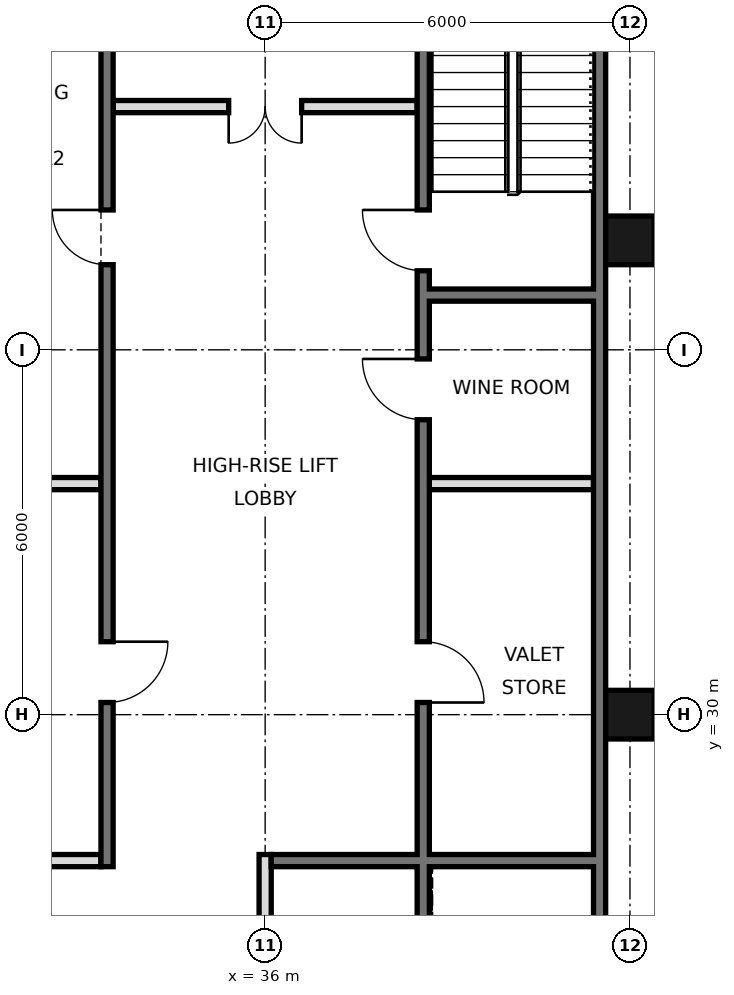
"""IFC4 building model, lengths in metres.
Left out: names, types, materials, properties, quantities, classifications, styles, units other than length and angle.
Written with IfcOpenShell. Run it as: python <this file> out.ifc"""

import sys

from ifc_helpers import new_model, si_unit, direction, frame, frame_2d, origin, origin_2d, place, context, subcontext, project, spatial, rectangle, hollow_rectangle, extrude, element, fill, save


model = new_model("IFC4")
c1 = context("Model", 3, precision=1e-05, world=origin(), true_north=direction((0.0, 1.0)))
c2 = subcontext(c1, "Body", "Model", "MODEL_VIEW")
j1 = project(units=[si_unit("LENGTHUNIT", "METRE"), si_unit("PLANEANGLEUNIT", "RADIAN")], contexts=[c1])
p1 = place(None, origin())
s1 = spatial("IfcSite", under=j1, at=p1, CompositionType="ELEMENT")
p2 = place(p1, origin())
s2 = spatial("IfcBuilding", under=s1, at=p2, CompositionType="ELEMENT")
p3 = place(p2, frame((0.0, 0.0, 67.8)))
s3 = spatial("IfcBuildingStorey", under=s2, at=p3, CompositionType="ELEMENT", Elevation=67.8)
for number, where, z_axis, x_axis in (
    (1, (42.0, 30.0, 0.0), (0.0, 0.0, 1.0), (1.0, 0.0, 0.0)),
    (2, (42.0, 37.8, 0.0), (0.0, 0.0, 1.0), (1.0, 0.0, 0.0)),
):
    element("IfcColumn", number, at=place(p3, frame(where, z_axis=z_axis, x_axis=x_axis)), inside=s3, PredefinedType="COLUMN", context=c2, shape_type="SweptSolid", body=[
        extrude(hollow_rectangle(XDim=0.8, YDim=0.8, WallThickness=0.06, at=origin_2d()), origin(), (0.0, 0.0, 1.0), 3.6),
    ])
p4 = place(p3, frame((41.5, 21.6, 0.0), z_axis=(0.0, 0.0, 1.0), x_axis=(0.0, 1.0, 0.0)))
e3 = element("IfcWall", 3, at=p4, inside=s3, PredefinedType="SOLIDWALL", context=c2, shape_type="SweptSolid", body=[
    extrude(rectangle(XDim=23.5, YDim=0.2, at=frame_2d((11.75, 0.0))), origin(), (0.0, 0.0, 1.0), 3.42),
])
p5 = place(p3, frame((33.4, 27.5, 0.0), z_axis=(0.0, 0.0, 1.0), x_axis=(0.0, 1.0, 0.0)))
e4 = element("IfcWall", 4, at=p5, inside=s3, PredefinedType="SOLIDWALL", context=c2, shape_type="SweptSolid", body=[
    extrude(rectangle(XDim=17.5, YDim=0.2, at=frame_2d((8.75, 0.0))), origin(), (0.0, 0.0, 1.0), 3.42),
])
p6 = place(p5, frame((15.4, 0.0, 0.0)))
e5 = element("IfcOpeningElement", 5, at=p6, cuts=e4, PredefinedType="OPENING", context=c2, shape_type="SweptSolid", body=[
    extrude(rectangle(XDim=1.1, YDim=2.1, at=frame_2d((0.55, 1.05))), frame((0.0, 0.11, 0.0), z_axis=(0.0, -1.0, 0.0), x_axis=(1.0, 0.0, 0.0)), (0.0, 0.0, 1.0), 0.22),
])
p7 = place(p5, frame((2.7, 0.0, 0.0)))
e6 = element("IfcOpeningElement", 6, at=p7, cuts=e4, PredefinedType="OPENING", context=c2, shape_type="SweptSolid", body=[
    extrude(rectangle(XDim=1.0, YDim=2.1, at=frame_2d((0.5, 1.05))), frame((0.0, 0.11, 0.0), z_axis=(0.0, -1.0, 0.0), x_axis=(1.0, 0.0, 0.0)), (0.0, 0.0, 1.0), 0.22),
])
p8 = place(p5, frame((9.9, 0.0, 0.0)))
e7 = element("IfcOpeningElement", 7, at=p8, cuts=e4, PredefinedType="OPENING", context=c2, shape_type="SweptSolid", body=[
    extrude(rectangle(XDim=0.9, YDim=2.1, at=frame_2d((0.45, 1.05))), frame((0.0, 0.11, 0.0), z_axis=(0.0, -1.0, 0.0), x_axis=(1.0, 0.0, 0.0)), (0.0, 0.0, 1.0), 0.22),
])
p9 = place(p3, frame((36.0, 21.6, 0.0), z_axis=(0.0, 0.0, 1.0), x_axis=(0.0, 1.0, 0.0)))
e8 = element("IfcWall", 8, at=p9, inside=s3, PredefinedType="PARTITIONING", context=c2, shape_type="SweptSolid", body=[
    extrude(rectangle(XDim=6.1, YDim=0.2, at=frame_2d((3.05, 0.0))), origin(), (0.0, 0.0, 1.0), 3.42),
])
p10 = place(p3, frame((38.6, 21.6, 0.0), z_axis=(0.0, 0.0, 1.0), x_axis=(0.0, 1.0, 0.0)))
e9 = element("IfcWall", 9, at=p10, inside=s3, PredefinedType="SOLIDWALL", context=c2, shape_type="SweptSolid", body=[
    extrude(rectangle(XDim=23.4, YDim=0.2, at=frame_2d((11.7, 0.0))), origin(), (0.0, 0.0, 1.0), 3.42),
])
p11 = place(p10, frame((8.6, 0.0, 0.0)))
e10 = element("IfcOpeningElement", 10, at=p11, cuts=e9, PredefinedType="OPENING", context=c2, shape_type="SweptSolid", body=[
    extrude(rectangle(XDim=1.0, YDim=2.1, at=frame_2d((0.5, 1.05))), frame((0.0, 0.11, 0.0), z_axis=(0.0, -1.0, 0.0), x_axis=(1.0, 0.0, 0.0)), (0.0, 0.0, 1.0), 0.22),
])
p12 = place(p10, frame((13.25, 0.0, 0.0)))
e11 = element("IfcOpeningElement", 11, at=p12, cuts=e9, PredefinedType="OPENING", context=c2, shape_type="SweptSolid", body=[
    extrude(rectangle(XDim=1.0, YDim=2.1, at=frame_2d((0.5, 1.05))), frame((0.0, 0.11, 0.0), z_axis=(0.0, -1.0, 0.0), x_axis=(1.0, 0.0, 0.0)), (0.0, 0.0, 1.0), 0.22),
])
p13 = place(p10, frame((15.7, 0.0, 0.0)))
e12 = element("IfcOpeningElement", 12, at=p13, cuts=e9, PredefinedType="OPENING", context=c2, shape_type="SweptSolid", body=[
    extrude(rectangle(XDim=1.0, YDim=2.1, at=frame_2d((0.5, 1.05))), frame((0.0, 0.11, 0.0), z_axis=(0.0, -1.0, 0.0), x_axis=(1.0, 0.0, 0.0)), (0.0, 0.0, 1.0), 0.22),
])
p14 = place(p10, frame((0.175, 0.0, 0.0)))
e13 = element("IfcOpeningElement", 13, at=p14, cuts=e9, PredefinedType="OPENING", context=c2, shape_type="SweptSolid", body=[
    extrude(rectangle(XDim=0.9, YDim=2.1, at=frame_2d((0.45, 1.05))), frame((0.0, 0.11, 0.0), z_axis=(0.0, -1.0, 0.0), x_axis=(1.0, 0.0, 0.0)), (0.0, 0.0, 1.0), 0.22),
])
p15 = place(p3, frame((30.6, 27.6, 0.0), z_axis=(0.0, 0.0, 1.0), x_axis=(1.0, 0.0, 0.0)))
e14 = element("IfcWall", 14, at=p15, inside=s3, PredefinedType="PARTITIONING", context=c2, shape_type="SweptSolid", body=[
    extrude(rectangle(XDim=2.7, YDim=0.2, at=frame_2d((1.35, 0.0))), origin(), (0.0, 0.0, 1.0), 3.42),
])
p16 = place(p3, frame((36.1, 27.6, 0.0), z_axis=(0.0, 0.0, 1.0), x_axis=(1.0, 0.0, 0.0)))
e15 = element("IfcWall", 15, at=p16, inside=s3, PredefinedType="SOLIDWALL", context=c2, shape_type="SweptSolid", body=[
    extrude(rectangle(XDim=5.3, YDim=0.2, at=frame_2d((2.65, 0.0))), origin(), (0.0, 0.0, 1.0), 3.42),
])
p17 = place(p3, frame((30.6, 33.8, 0.0), z_axis=(0.0, 0.0, 1.0), x_axis=(1.0, 0.0, 0.0)))
e16 = element("IfcWall", 16, at=p17, inside=s3, PredefinedType="SOLIDWALL", context=c2, shape_type="SweptSolid", body=[
    extrude(rectangle(XDim=2.7, YDim=0.2, at=frame_2d((1.35, 0.0))), origin(), (0.0, 0.0, 1.0), 3.42),
])
p18 = place(p3, frame((38.7, 33.8, 0.0), z_axis=(0.0, 0.0, 1.0), x_axis=(1.0, 0.0, 0.0)))
e17 = element("IfcWall", 17, at=p18, inside=s3, PredefinedType="PARTITIONING", context=c2, shape_type="SweptSolid", body=[
    extrude(rectangle(XDim=2.7, YDim=0.2, at=frame_2d((1.35, 0.0))), origin(), (0.0, 0.0, 1.0), 3.42),
])
p19 = place(p3, frame((38.7, 36.9, 0.0), z_axis=(0.0, 0.0, 1.0), x_axis=(1.0, 0.0, 0.0)))
e18 = element("IfcWall", 18, at=p19, inside=s3, PredefinedType="SOLIDWALL", context=c2, shape_type="SweptSolid", body=[
    extrude(rectangle(XDim=2.7, YDim=0.2, at=frame_2d((1.35, 0.0))), origin(), (0.0, 0.0, 1.0), 3.42),
])
p20 = place(p3, frame((33.5, 40.0, 0.0), z_axis=(0.0, 0.0, 1.0), x_axis=(1.0, 0.0, 0.0)))
e19 = element("IfcWall", 19, at=p20, inside=s3, PredefinedType="PARTITIONING", context=c2, shape_type="SweptSolid", body=[
    extrude(rectangle(XDim=5.0, YDim=0.2, at=frame_2d((2.5, 0.0))), origin(), (0.0, 0.0, 1.0), 3.42),
])
p21 = place(p20, frame((1.9, 0.0, 0.0)))
e20 = element("IfcOpeningElement", 20, at=p21, cuts=e19, PredefinedType="OPENING", context=c2, shape_type="SweptSolid", body=[
    extrude(rectangle(XDim=1.2, YDim=2.1, at=frame_2d((0.6, 1.05))), frame((0.0, 0.11, 0.0), z_axis=(0.0, -1.0, 0.0), x_axis=(1.0, 0.0, 0.0)), (0.0, 0.0, 1.0), 0.22),
])
p22 = place(p21, frame((1.2, 0.0, 0.0), z_axis=(0.0, 0.0, 1.0), x_axis=(-1.0, 0.0, 0.0)))
e21 = element("IfcDoor", 21, at=p22, inside=s3, OperationType="DOUBLE_DOOR_SINGLE_SWING", PredefinedType="DOOR", context=c2, shape_type="SweptSolid", body=[
    extrude(rectangle(XDim=1.2, YDim=2.1, at=frame_2d((0.6, 1.05))), frame((0.0, 0.025, 0.0), z_axis=(0.0, -1.0, 0.0), x_axis=(1.0, 0.0, 0.0)), (0.0, 0.0, 1.0), 0.05),
])
fill(e20, e21)
p23 = place(p11, frame((1.0, 0.0, 0.0), z_axis=(0.0, 0.0, 1.0), x_axis=(-1.0, 0.0, 0.0)))
e22 = element("IfcDoor", 22, at=p23, inside=s3, OperationType="SINGLE_SWING_RIGHT", PredefinedType="DOOR", context=c2, shape_type="SweptSolid", body=[
    extrude(rectangle(XDim=1.0, YDim=2.1, at=frame_2d((0.5, 1.05))), frame((0.0, 0.025, 0.0), z_axis=(0.0, -1.0, 0.0), x_axis=(1.0, 0.0, 0.0)), (0.0, 0.0, 1.0), 0.05),
])
fill(e10, e22)
p24 = place(p12, frame((1.0, 0.0, 0.0), z_axis=(0.0, 0.0, 1.0), x_axis=(-1.0, 0.0, 0.0)))
e23 = element("IfcDoor", 23, at=p24, inside=s3, OperationType="SINGLE_SWING_LEFT", PredefinedType="DOOR", context=c2, shape_type="SweptSolid", body=[
    extrude(rectangle(XDim=1.0, YDim=2.1, at=frame_2d((0.5, 1.05))), frame((0.0, 0.025, 0.0), z_axis=(0.0, -1.0, 0.0), x_axis=(1.0, 0.0, 0.0)), (0.0, 0.0, 1.0), 0.05),
])
fill(e11, e23)
p25 = place(p7, origin())
e24 = element("IfcDoor", 24, at=p25, inside=s3, OperationType="SINGLE_SWING_RIGHT", PredefinedType="DOOR", context=c2, shape_type="SweptSolid", body=[
    extrude(rectangle(XDim=1.0, YDim=2.1, at=frame_2d((0.5, 1.05))), frame((0.0, 0.025, 0.0), z_axis=(0.0, -1.0, 0.0), x_axis=(1.0, 0.0, 0.0)), (0.0, 0.0, 1.0), 0.05),
])
fill(e6, e24)
p26 = place(p13, frame((1.0, 0.0, 0.0), z_axis=(0.0, 0.0, 1.0), x_axis=(-1.0, 0.0, 0.0)))
e25 = element("IfcDoor", 25, at=p26, inside=s3, OperationType="SINGLE_SWING_LEFT", PredefinedType="DOOR", context=c2, shape_type="SweptSolid", body=[
    extrude(rectangle(XDim=1.0, YDim=2.1, at=frame_2d((0.5, 1.05))), frame((0.0, 0.025, 0.0), z_axis=(0.0, -1.0, 0.0), x_axis=(1.0, 0.0, 0.0)), (0.0, 0.0, 1.0), 0.05),
])
fill(e12, e25)
p27 = place(p8, frame((0.9, 0.0, 0.0), z_axis=(0.0, 0.0, 1.0), x_axis=(-1.0, 0.0, 0.0)))
e26 = element("IfcDoor", 26, at=p27, inside=s3, OperationType="SINGLE_SWING_LEFT", PredefinedType="DOOR", context=c2, shape_type="SweptSolid", body=[
    extrude(rectangle(XDim=0.9, YDim=2.1, at=frame_2d((0.45, 1.05))), frame((0.0, 0.025, 0.0), z_axis=(0.0, -1.0, 0.0), x_axis=(1.0, 0.0, 0.0)), (0.0, 0.0, 1.0), 0.05),
])
fill(e7, e26)
save(model, sys.argv[1])
